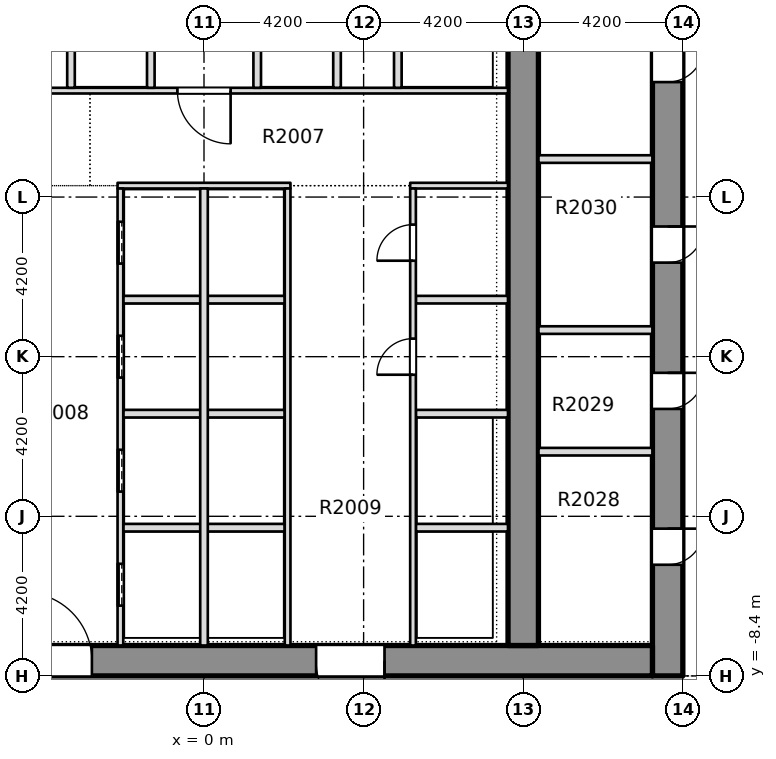
"""IFC4 building model, lengths in metres.
Left out: names, types, materials, properties, quantities, classifications, styles, units other than length and angle.
Written with IfcOpenShell. Run it as: python <this file> out.ifc"""

import sys

from ifc_helpers import new_model, si_unit, direction, frame, frame_2d, origin, place, context, subcontext, project, spatial, rectangle, extrude, element, fill, save


model = new_model("IFC4")
c1 = context("Model", 3, precision=1e-05, world=origin(), true_north=direction((0.0, 1.0)))
c2 = subcontext(c1, "Body", "Model", "MODEL_VIEW")
j1 = project(units=[si_unit("LENGTHUNIT", "METRE"), si_unit("PLANEANGLEUNIT", "RADIAN")], contexts=[c1])
p1 = place(None, origin())
s1 = spatial("IfcSite", under=j1, at=p1, CompositionType="ELEMENT")
p2 = place(p1, origin())
s2 = spatial("IfcBuilding", under=s1, at=p2, CompositionType="ELEMENT")
p3 = place(p2, frame((0.0, 0.0, 83.85)))
s3 = spatial("IfcBuildingStorey", under=s2, at=p3, CompositionType="ELEMENT", Elevation=83.85)
p4 = place(p3, frame((12.2, -8.4, -0.32), z_axis=(0.0, 0.0, 1.0), x_axis=(0.0, 1.0, 0.0)))
e1 = element("IfcWall", 1, at=p4, inside=s3, PredefinedType="SHEAR", context=c2, shape_type="SweptSolid", body=[
    extrude(rectangle(XDim=30.15, YDim=0.8, at=frame_2d((15.075, 0.0))), origin(), (0.0, 0.0, 1.0), 3.45),
])
p5 = place(p4, frame((2.925, 0.0, 0.32)))
e2 = element("IfcOpeningElement", 2, at=p5, cuts=e1, PredefinedType="OPENING", context=c2, shape_type="SweptSolid", body=[
    extrude(rectangle(XDim=0.95, YDim=2.1, at=frame_2d((0.475, 1.05))), frame((0.0, 0.41, 0.0), z_axis=(0.0, -1.0, 0.0), x_axis=(1.0, 0.0, 0.0)), (0.0, 0.0, 1.0), 0.82),
])
p6 = place(p4, frame((7.025, 0.0, 0.32)))
e3 = element("IfcOpeningElement", 3, at=p6, cuts=e1, PredefinedType="OPENING", context=c2, shape_type="SweptSolid", body=[
    extrude(rectangle(XDim=0.95, YDim=2.1, at=frame_2d((0.475, 1.05))), frame((0.0, 0.41, 0.0), z_axis=(0.0, -1.0, 0.0), x_axis=(1.0, 0.0, 0.0)), (0.0, 0.0, 1.0), 0.82),
])
p7 = place(p4, frame((10.875, 0.0, 0.32)))
e4 = element("IfcOpeningElement", 4, at=p7, cuts=e1, PredefinedType="OPENING", context=c2, shape_type="SweptSolid", body=[
    extrude(rectangle(XDim=0.95, YDim=2.1, at=frame_2d((0.475, 1.05))), frame((0.0, 0.41, 0.0), z_axis=(0.0, -1.0, 0.0), x_axis=(1.0, 0.0, 0.0)), (0.0, 0.0, 1.0), 0.82),
])
p8 = place(p4, frame((15.625, 0.0, 0.32)))
e5 = element("IfcOpeningElement", 5, at=p8, cuts=e1, PredefinedType="OPENING", context=c2, shape_type="SweptSolid", body=[
    extrude(rectangle(XDim=0.95, YDim=2.1, at=frame_2d((0.475, 1.05))), frame((0.0, 0.41, 0.0), z_axis=(0.0, -1.0, 0.0), x_axis=(1.0, 0.0, 0.0)), (0.0, 0.0, 1.0), 0.82),
])
p9 = place(p4, frame((24.75, 0.0, 0.32)))
e6 = element("IfcOpeningElement", 6, at=p9, cuts=e1, PredefinedType="OPENING", context=c2, shape_type="SweptSolid", body=[
    extrude(rectangle(XDim=0.95, YDim=2.1, at=frame_2d((0.475, 1.05))), frame((0.0, 0.41, 0.0), z_axis=(0.0, -1.0, 0.0), x_axis=(1.0, 0.0, 0.0)), (0.0, 0.0, 1.0), 0.82),
])
p10 = place(p4, frame((19.3, 0.0, 0.32)))
e7 = element("IfcOpeningElement", 7, at=p10, cuts=e1, PredefinedType="OPENING", context=c2, shape_type="SweptSolid", body=[
    extrude(rectangle(XDim=1.2, YDim=2.1, at=frame_2d((0.6, 1.05))), frame((0.0, 0.41, 0.0), z_axis=(0.0, -1.0, 0.0), x_axis=(1.0, 0.0, 0.0)), (0.0, 0.0, 1.0), 0.82),
])
p11 = place(p3, frame((-11.8, -8.0, -0.32), z_axis=(0.0, 0.0, 1.0), x_axis=(1.0, 0.0, 0.0)))
e8 = element("IfcWall", 8, at=p11, inside=s3, PredefinedType="SHEAR", context=c2, shape_type="SweptSolid", body=[
    extrude(rectangle(XDim=23.6, YDim=0.8, at=frame_2d((11.8, 0.0))), origin(), (0.0, 0.0, 1.0), 3.45),
])
p12 = place(p11, frame((7.05, 0.0, 0.32)))
e9 = element("IfcOpeningElement", 9, at=p12, cuts=e8, PredefinedType="OPENING", context=c2, shape_type="SweptSolid", body=[
    extrude(rectangle(XDim=1.8, YDim=2.1, at=frame_2d((0.9, 1.05))), frame((0.0, 0.41, 0.0), z_axis=(0.0, -1.0, 0.0), x_axis=(1.0, 0.0, 0.0)), (0.0, 0.0, 1.0), 0.82),
])
p13 = place(p11, frame((14.75, 0.0, 0.32)))
e10 = element("IfcOpeningElement", 10, at=p13, cuts=e8, PredefinedType="OPENING", context=c2, shape_type="SweptSolid", body=[
    extrude(rectangle(XDim=1.8, YDim=2.1, at=frame_2d((0.9, 1.05))), frame((0.0, 0.41, 0.0), z_axis=(0.0, -1.0, 0.0), x_axis=(1.0, 0.0, 0.0)), (0.0, 0.0, 1.0), 0.82),
])
p14 = place(p3, frame((8.4, -7.6, -0.32), z_axis=(0.0, 0.0, 1.0), x_axis=(0.0, 1.0, 0.0)))
e11 = element("IfcWall", 11, at=p14, inside=s3, PredefinedType="SHEAR", context=c2, shape_type="SweptSolid", body=[
    extrude(rectangle(XDim=28.55, YDim=0.8, at=frame_2d((14.275, 0.0))), origin(), (0.0, 0.0, 1.0), 3.45),
])
p15 = place(p14, frame((18.5, 0.0, 0.32)))
e12 = element("IfcOpeningElement", 12, at=p15, cuts=e11, PredefinedType="OPENING", context=c2, shape_type="SweptSolid", body=[
    extrude(rectangle(XDim=1.2, YDim=2.1, at=frame_2d((0.6, 1.05))), frame((0.0, 0.41, 0.0), z_axis=(0.0, -1.0, 0.0), x_axis=(1.0, 0.0, 0.0)), (0.0, 0.0, 1.0), 0.82),
])
p16 = place(p3, frame((-2.125, -4.5, 0.0), z_axis=(0.0, 0.0, 1.0), x_axis=(1.0, 0.0, 0.0)))
e13 = element("IfcWall", 13, at=p16, inside=s3, PredefinedType="PARTITIONING", context=c2, shape_type="SweptSolid", body=[
    extrude(rectangle(XDim=4.25, YDim=0.2, at=frame_2d((2.125, 0.0))), origin(), (0.0, 0.0, 1.0), 3.13),
])
p17 = place(p3, frame((5.575, -4.5, 0.0), z_axis=(0.0, 0.0, 1.0), x_axis=(1.0, 0.0, 0.0)))
e14 = element("IfcWall", 14, at=p17, inside=s3, PredefinedType="PARTITIONING", context=c2, shape_type="SweptSolid", body=[
    extrude(rectangle(XDim=2.424, YDim=0.2, at=frame_2d((1.212, 0.0))), origin(), (0.0, 0.0, 1.0), 3.13),
])
p18 = place(p3, frame((-2.125, -1.5, 0.0), z_axis=(0.0, 0.0, 1.0), x_axis=(1.0, 0.0, 0.0)))
e15 = element("IfcWall", 15, at=p18, inside=s3, PredefinedType="PARTITIONING", context=c2, shape_type="SweptSolid", body=[
    extrude(rectangle(XDim=4.25, YDim=0.2, at=frame_2d((2.125, 0.0))), origin(), (0.0, 0.0, 1.0), 3.13),
])
p19 = place(p3, frame((5.575, -1.5, 0.0), z_axis=(0.0, 0.0, 1.0), x_axis=(1.0, 0.0, 0.0)))
e16 = element("IfcWall", 16, at=p19, inside=s3, PredefinedType="PARTITIONING", context=c2, shape_type="SweptSolid", body=[
    extrude(rectangle(XDim=2.424, YDim=0.2, at=frame_2d((1.212, 0.0))), origin(), (0.0, 0.0, 1.0), 3.13),
])
p20 = place(p3, frame((-2.125, 1.5, 0.0), z_axis=(0.0, 0.0, 1.0), x_axis=(1.0, 0.0, 0.0)))
e17 = element("IfcWall", 17, at=p20, inside=s3, PredefinedType="PARTITIONING", context=c2, shape_type="SweptSolid", body=[
    extrude(rectangle(XDim=4.25, YDim=0.2, at=frame_2d((2.125, 0.0))), origin(), (0.0, 0.0, 1.0), 3.13),
])
p21 = place(p3, frame((5.575, 1.5, 0.0), z_axis=(0.0, 0.0, 1.0), x_axis=(1.0, 0.0, 0.0)))
e18 = element("IfcWall", 18, at=p21, inside=s3, PredefinedType="PARTITIONING", context=c2, shape_type="SweptSolid", body=[
    extrude(rectangle(XDim=2.424, YDim=0.2, at=frame_2d((1.212, 0.0))), origin(), (0.0, 0.0, 1.0), 3.13),
])
p22 = place(p3, frame((-2.275, 4.5, 0.0), z_axis=(0.0, 0.0, 1.0), x_axis=(1.0, 0.0, 0.0)))
e19 = element("IfcWall", 19, at=p22, inside=s3, PredefinedType="PARTITIONING", context=c2, shape_type="SweptSolid", body=[
    extrude(rectangle(XDim=4.55, YDim=0.15, at=frame_2d((2.275, 0.0))), origin(), (0.0, 0.0, 1.0), 3.13),
])
p23 = place(p3, frame((5.425, 4.5, 0.0), z_axis=(0.0, 0.0, 1.0), x_axis=(1.0, 0.0, 0.0)))
e20 = element("IfcWall", 20, at=p23, inside=s3, PredefinedType="PARTITIONING", context=c2, shape_type="SweptSolid", body=[
    extrude(rectangle(XDim=2.574, YDim=0.15, at=frame_2d((1.287, 0.0))), origin(), (0.0, 0.0, 1.0), 3.13),
])
p24 = place(p3, frame((-7.999, 7.0, 0.0), z_axis=(0.0, 0.0, 1.0), x_axis=(1.0, 0.0, 0.0)))
e21 = element("IfcWall", 21, at=p24, inside=s3, PredefinedType="PARTITIONING", context=c2, shape_type="SweptSolid", body=[
    extrude(rectangle(XDim=15.998, YDim=0.15, at=frame_2d((7.999, 0.0))), origin(), (0.0, 0.0, 1.0), 3.13),
])
p25 = place(p24, frame((7.299, 0.0, 0.0)))
e22 = element("IfcOpeningElement", 22, at=p25, cuts=e21, PredefinedType="OPENING", context=c2, shape_type="SweptSolid", body=[
    extrude(rectangle(XDim=1.4, YDim=2.1, at=frame_2d((0.7, 1.05))), frame((0.0, 0.085, 0.0), z_axis=(0.0, -1.0, 0.0), x_axis=(1.0, 0.0, 0.0)), (0.0, 0.0, 1.0), 0.17),
])
p26 = place(p3, frame((-3.5, 7.075, 0.0), z_axis=(0.0, 0.0, 1.0), x_axis=(0.0, 1.0, 0.0)))
e23 = element("IfcWall", 23, at=p26, inside=s3, PredefinedType="PARTITIONING", context=c2, shape_type="SweptSolid", body=[
    extrude(rectangle(XDim=2.85, YDim=0.2, at=frame_2d((1.425, 0.0))), origin(), (0.0, 0.0, 1.0), 3.13),
])
p27 = place(p3, frame((-2.2, -7.599, 0.0), z_axis=(0.0, 0.0, 1.0), x_axis=(0.0, 1.0, 0.0)))
e24 = element("IfcWall", 24, at=p27, inside=s3, PredefinedType="PARTITIONING", context=c2, shape_type="SweptSolid", body=[
    extrude(rectangle(XDim=12.024, YDim=0.15, at=frame_2d((6.012, 0.0))), origin(), (0.0, 0.0, 1.0), 3.13),
])
p28 = place(p27, frame((1.049, 0.0, 0.0)))
e25 = element("IfcOpeningElement", 25, at=p28, cuts=e24, PredefinedType="OPENING", context=c2, shape_type="SweptSolid", body=[
    extrude(rectangle(XDim=1.1, YDim=2.1, at=frame_2d((0.55, 1.05))), frame((0.0, 0.085, 0.0), z_axis=(0.0, -1.0, 0.0), x_axis=(1.0, 0.0, 0.0)), (0.0, 0.0, 1.0), 0.17),
])
p29 = place(p27, frame((4.049, 0.0, 0.0)))
e26 = element("IfcOpeningElement", 26, at=p29, cuts=e24, PredefinedType="OPENING", context=c2, shape_type="SweptSolid", body=[
    extrude(rectangle(XDim=1.1, YDim=2.1, at=frame_2d((0.55, 1.05))), frame((0.0, 0.085, 0.0), z_axis=(0.0, -1.0, 0.0), x_axis=(1.0, 0.0, 0.0)), (0.0, 0.0, 1.0), 0.17),
])
p30 = place(p27, frame((7.049, 0.0, 0.0)))
e27 = element("IfcOpeningElement", 27, at=p30, cuts=e24, PredefinedType="OPENING", context=c2, shape_type="SweptSolid", body=[
    extrude(rectangle(XDim=1.1, YDim=2.1, at=frame_2d((0.55, 1.05))), frame((0.0, 0.085, 0.0), z_axis=(0.0, -1.0, 0.0), x_axis=(1.0, 0.0, 0.0)), (0.0, 0.0, 1.0), 0.17),
])
p31 = place(p27, frame((10.049, 0.0, 0.0)))
e28 = element("IfcOpeningElement", 28, at=p31, cuts=e24, PredefinedType="OPENING", context=c2, shape_type="SweptSolid", body=[
    extrude(rectangle(XDim=1.1, YDim=2.1, at=frame_2d((0.55, 1.05))), frame((0.0, 0.085, 0.0), z_axis=(0.0, -1.0, 0.0), x_axis=(1.0, 0.0, 0.0)), (0.0, 0.0, 1.0), 0.17),
])
p32 = place(p3, frame((-1.4, 7.075, 0.0), z_axis=(0.0, 0.0, 1.0), x_axis=(0.0, 1.0, 0.0)))
e29 = element("IfcWall", 29, at=p32, inside=s3, PredefinedType="PARTITIONING", context=c2, shape_type="SweptSolid", body=[
    extrude(rectangle(XDim=2.85, YDim=0.2, at=frame_2d((1.425, 0.0))), origin(), (0.0, 0.0, 1.0), 3.13),
])
p33 = place(p3, frame((0.0, -7.599, 0.0), z_axis=(0.0, 0.0, 1.0), x_axis=(0.0, 1.0, 0.0)))
e30 = element("IfcWall", 30, at=p33, inside=s3, PredefinedType="PARTITIONING", context=c2, shape_type="SweptSolid", body=[
    extrude(rectangle(XDim=12.024, YDim=0.2, at=frame_2d((6.012, 0.0))), origin(), (0.0, 0.0, 1.0), 3.13),
])
p34 = place(p3, frame((1.4, 7.075, 0.0), z_axis=(0.0, 0.0, 1.0), x_axis=(0.0, 1.0, 0.0)))
e31 = element("IfcWall", 31, at=p34, inside=s3, PredefinedType="PARTITIONING", context=c2, shape_type="SweptSolid", body=[
    extrude(rectangle(XDim=2.85, YDim=0.2, at=frame_2d((1.425, 0.0))), origin(), (0.0, 0.0, 1.0), 3.13),
])
p35 = place(p3, frame((2.2, -7.599, 0.0), z_axis=(0.0, 0.0, 1.0), x_axis=(0.0, 1.0, 0.0)))
e32 = element("IfcWall", 32, at=p35, inside=s3, PredefinedType="PARTITIONING", context=c2, shape_type="SweptSolid", body=[
    extrude(rectangle(XDim=12.024, YDim=0.15, at=frame_2d((6.012, 0.0))), origin(), (0.0, 0.0, 1.0), 3.13),
])
p36 = place(p3, frame((3.5, 7.075, 0.0), z_axis=(0.0, 0.0, 1.0), x_axis=(0.0, 1.0, 0.0)))
e33 = element("IfcWall", 33, at=p36, inside=s3, PredefinedType="PARTITIONING", context=c2, shape_type="SweptSolid", body=[
    extrude(rectangle(XDim=2.85, YDim=0.2, at=frame_2d((1.425, 0.0))), origin(), (0.0, 0.0, 1.0), 3.13),
])
p37 = place(p3, frame((5.1, 7.075, 0.0), z_axis=(0.0, 0.0, 1.0), x_axis=(0.0, 1.0, 0.0)))
e34 = element("IfcWall", 34, at=p37, inside=s3, PredefinedType="PARTITIONING", context=c2, shape_type="SweptSolid", body=[
    extrude(rectangle(XDim=2.725, YDim=0.2, at=frame_2d((1.363, 0.0))), origin(), (0.0, 0.0, 1.0), 3.13),
])
p38 = place(p3, frame((5.5, -7.599, 0.0), z_axis=(0.0, 0.0, 1.0), x_axis=(0.0, 1.0, 0.0)))
e35 = element("IfcWall", 35, at=p38, inside=s3, PredefinedType="PARTITIONING", context=c2, shape_type="SweptSolid", body=[
    extrude(rectangle(XDim=12.024, YDim=0.15, at=frame_2d((6.012, 0.0))), origin(), (0.0, 0.0, 1.0), 3.13),
])
p39 = place(p38, frame((7.124, 0.0, 0.0)))
e36 = element("IfcOpeningElement", 36, at=p39, cuts=e35, PredefinedType="OPENING", context=c2, shape_type="SweptSolid", body=[
    extrude(rectangle(XDim=0.95, YDim=2.1, at=frame_2d((0.475, 1.05))), frame((0.0, 0.085, 0.0), z_axis=(0.0, -1.0, 0.0), x_axis=(1.0, 0.0, 0.0)), (0.0, 0.0, 1.0), 0.17),
])
p40 = place(p38, frame((10.124, 0.0, 0.0)))
e37 = element("IfcOpeningElement", 37, at=p40, cuts=e35, PredefinedType="OPENING", context=c2, shape_type="SweptSolid", body=[
    extrude(rectangle(XDim=0.95, YDim=2.1, at=frame_2d((0.475, 1.05))), frame((0.0, 0.085, 0.0), z_axis=(0.0, -1.0, 0.0), x_axis=(1.0, 0.0, 0.0)), (0.0, 0.0, 1.0), 0.17),
])
for number, where, z_axis, x_axis in (
    (38, (8.801, -2.5, 0.0), (0.0, 0.0, 1.0), (1.0, 0.0, 0.0)),
    (39, (8.801, 0.7, 0.0), (0.0, 0.0, 1.0), (1.0, 0.0, 0.0)),
    (40, (8.801, 5.2, 0.0), (0.0, 0.0, 1.0), (1.0, 0.0, 0.0)),
):
    element("IfcWall", number, at=place(p3, frame(where, z_axis=z_axis, x_axis=x_axis)), inside=s3, PredefinedType="PARTITIONING", context=c2, shape_type="SweptSolid", body=[
        extrude(rectangle(XDim=2.998, YDim=0.2, at=frame_2d((1.499, 0.0))), origin(), (0.0, 0.0, 1.0), 3.13),
    ])
p41 = place(p28, origin())
e41 = element("IfcDoor", 41, at=p41, inside=s3, OperationType="SLIDING_TO_LEFT", PredefinedType="DOOR", context=c2, shape_type="SweptSolid", body=[
    extrude(rectangle(XDim=1.1, YDim=2.1, at=frame_2d((0.55, 1.05))), frame((0.0, 0.025, 0.0), z_axis=(0.0, -1.0, 0.0), x_axis=(1.0, 0.0, 0.0)), (0.0, 0.0, 1.0), 0.05),
])
fill(e25, e41)
p42 = place(p29, origin())
e42 = element("IfcDoor", 42, at=p42, inside=s3, OperationType="SLIDING_TO_LEFT", PredefinedType="DOOR", context=c2, shape_type="SweptSolid", body=[
    extrude(rectangle(XDim=1.1, YDim=2.1, at=frame_2d((0.55, 1.05))), frame((0.0, 0.025, 0.0), z_axis=(0.0, -1.0, 0.0), x_axis=(1.0, 0.0, 0.0)), (0.0, 0.0, 1.0), 0.05),
])
fill(e26, e42)
p43 = place(p30, origin())
e43 = element("IfcDoor", 43, at=p43, inside=s3, OperationType="SLIDING_TO_LEFT", PredefinedType="DOOR", context=c2, shape_type="SweptSolid", body=[
    extrude(rectangle(XDim=1.1, YDim=2.1, at=frame_2d((0.55, 1.05))), frame((0.0, 0.025, 0.0), z_axis=(0.0, -1.0, 0.0), x_axis=(1.0, 0.0, 0.0)), (0.0, 0.0, 1.0), 0.05),
])
fill(e27, e43)
p44 = place(p31, origin())
e44 = element("IfcDoor", 44, at=p44, inside=s3, OperationType="SLIDING_TO_LEFT", PredefinedType="DOOR", context=c2, shape_type="SweptSolid", body=[
    extrude(rectangle(XDim=1.1, YDim=2.1, at=frame_2d((0.55, 1.05))), frame((0.0, 0.025, 0.0), z_axis=(0.0, -1.0, 0.0), x_axis=(1.0, 0.0, 0.0)), (0.0, 0.0, 1.0), 0.05),
])
fill(e28, e44)
p45 = place(p39, origin())
e45 = element("IfcDoor", 45, at=p45, inside=s3, OperationType="SINGLE_SWING_RIGHT", PredefinedType="DOOR", context=c2, shape_type="SweptSolid", body=[
    extrude(rectangle(XDim=0.95, YDim=2.1, at=frame_2d((0.475, 1.05))), frame((0.0, 0.025, 0.0), z_axis=(0.0, -1.0, 0.0), x_axis=(1.0, 0.0, 0.0)), (0.0, 0.0, 1.0), 0.05),
])
fill(e36, e45)
p46 = place(p40, origin())
e46 = element("IfcDoor", 46, at=p46, inside=s3, OperationType="SINGLE_SWING_RIGHT", PredefinedType="DOOR", context=c2, shape_type="SweptSolid", body=[
    extrude(rectangle(XDim=0.95, YDim=2.1, at=frame_2d((0.475, 1.05))), frame((0.0, 0.025, 0.0), z_axis=(0.0, -1.0, 0.0), x_axis=(1.0, 0.0, 0.0)), (0.0, 0.0, 1.0), 0.05),
])
fill(e37, e46)
p47 = place(p25, origin())
e47 = element("IfcDoor", 47, at=p47, inside=s3, OperationType="SINGLE_SWING_RIGHT", PredefinedType="DOOR", context=c2, shape_type="SweptSolid", body=[
    extrude(rectangle(XDim=1.4, YDim=2.1, at=frame_2d((0.7, 1.05))), frame((0.0, 0.025, 0.0), z_axis=(0.0, -1.0, 0.0), x_axis=(1.0, 0.0, 0.0)), (0.0, 0.0, 1.0), 0.05),
])
fill(e22, e47)
p48 = place(p12, origin())
e48 = element("IfcDoor", 48, at=p48, inside=s3, OperationType="SINGLE_SWING_LEFT", PredefinedType="DOOR", context=c2, shape_type="SweptSolid", body=[
    extrude(rectangle(XDim=1.8, YDim=2.1, at=frame_2d((0.9, 1.05))), frame((0.0, 0.025, 0.0), z_axis=(0.0, -1.0, 0.0), x_axis=(1.0, 0.0, 0.0)), (0.0, 0.0, 1.0), 0.05),
])
fill(e9, e48)
p49 = place(p13, origin())
e49 = element("IfcDoor", 49, at=p49, inside=s3, OperationType="SINGLE_SWING_LEFT", PredefinedType="DOOR", context=c2, shape_type="SweptSolid", body=[
    extrude(rectangle(XDim=1.8, YDim=2.1, at=frame_2d((0.9, 1.05))), frame((0.0, 0.025, 0.0), z_axis=(0.0, -1.0, 0.0), x_axis=(1.0, 0.0, 0.0)), (0.0, 0.0, 1.0), 0.05),
])
fill(e10, e49)
p50 = place(p5, origin())
e50 = element("IfcDoor", 50, at=p50, inside=s3, OperationType="SINGLE_SWING_LEFT", PredefinedType="DOOR", context=c2, shape_type="SweptSolid", body=[
    extrude(rectangle(XDim=0.95, YDim=2.1, at=frame_2d((0.475, 1.05))), frame((0.0, 0.025, 0.0), z_axis=(0.0, -1.0, 0.0), x_axis=(1.0, 0.0, 0.0)), (0.0, 0.0, 1.0), 0.05),
])
fill(e2, e50)
p51 = place(p6, origin())
e51 = element("IfcDoor", 51, at=p51, inside=s3, OperationType="SINGLE_SWING_LEFT", PredefinedType="DOOR", context=c2, shape_type="SweptSolid", body=[
    extrude(rectangle(XDim=0.95, YDim=2.1, at=frame_2d((0.475, 1.05))), frame((0.0, 0.025, 0.0), z_axis=(0.0, -1.0, 0.0), x_axis=(1.0, 0.0, 0.0)), (0.0, 0.0, 1.0), 0.05),
])
fill(e3, e51)
p52 = place(p7, origin())
e52 = element("IfcDoor", 52, at=p52, inside=s3, OperationType="SINGLE_SWING_LEFT", PredefinedType="DOOR", context=c2, shape_type="SweptSolid", body=[
    extrude(rectangle(XDim=0.95, YDim=2.1, at=frame_2d((0.475, 1.05))), frame((0.0, 0.025, 0.0), z_axis=(0.0, -1.0, 0.0), x_axis=(1.0, 0.0, 0.0)), (0.0, 0.0, 1.0), 0.05),
])
fill(e4, e52)
p53 = place(p8, origin())
e53 = element("IfcDoor", 53, at=p53, inside=s3, OperationType="SINGLE_SWING_LEFT", PredefinedType="DOOR", context=c2, shape_type="SweptSolid", body=[
    extrude(rectangle(XDim=0.95, YDim=2.1, at=frame_2d((0.475, 1.05))), frame((0.0, 0.025, 0.0), z_axis=(0.0, -1.0, 0.0), x_axis=(1.0, 0.0, 0.0)), (0.0, 0.0, 1.0), 0.05),
])
fill(e5, e53)
save(model, sys.argv[1])
